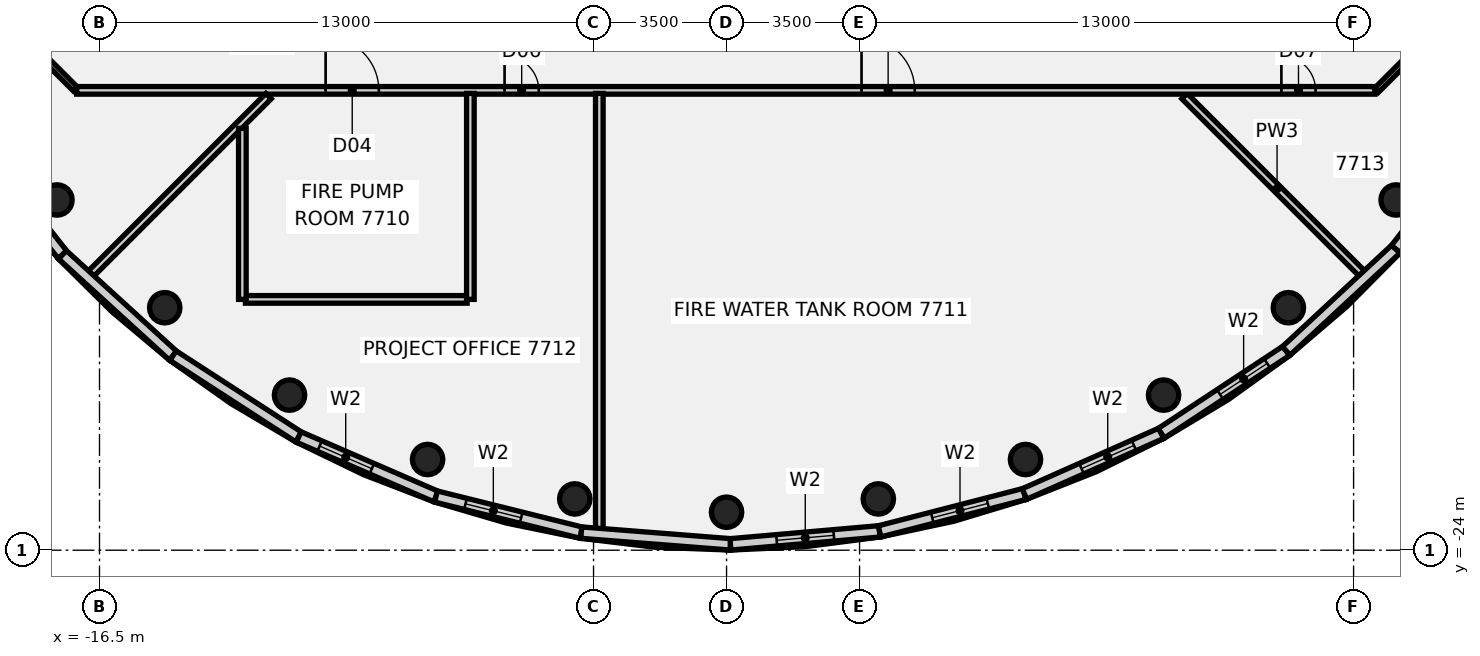
"""IFC4 building model, lengths in metres.
Left out: names, types, materials, properties, quantities, classifications, styles, units other than length and angle.
Written with IfcOpenShell. Run it as: python <this file> out.ifc"""

import sys

from ifc_helpers import new_model, si_unit, direction, frame, frame_2d, origin, origin_2d, place, context, subcontext, project, spatial, rectangle, circle, extrude, element, fill, save


model = new_model("IFC4")
c1 = context("Model", 3, precision=1e-05, world=origin(), true_north=direction((0.0, 1.0)))
c2 = subcontext(c1, "Body", "Model", "MODEL_VIEW")
j1 = project(units=[si_unit("LENGTHUNIT", "METRE"), si_unit("PLANEANGLEUNIT", "RADIAN")], contexts=[c1])
p1 = place(None, origin())
s1 = spatial("IfcSite", under=j1, at=p1, CompositionType="ELEMENT")
p2 = place(p1, origin())
s2 = spatial("IfcBuilding", under=s1, at=p2, CompositionType="ELEMENT")
p3 = place(p2, frame((0.0, 0.0, 313.4)))
s3 = spatial("IfcBuildingStorey", under=s2, at=p3, CompositionType="ELEMENT", Elevation=313.4)
for number, where, z_axis, x_axis in (
    (1, (-17.619, -14.784, -0.18), (0.0, 0.0, 1.0), (1.0, 0.0, 0.0)),
    (2, (-14.784, -17.619, -0.18), (0.0, 0.0, 1.0), (1.0, 0.0, 0.0)),
    (3, (-11.5, -19.919, -0.18), (0.0, 0.0, 1.0), (1.0, 0.0, 0.0)),
    (4, (-7.866, -21.613, -0.18), (0.0, 0.0, 1.0), (1.0, 0.0, 0.0)),
    (5, (-3.994, -22.651, -0.18), (0.0, 0.0, 1.0), (1.0, 0.0, 0.0)),
    (6, (0.0, -23.0, -0.18), (0.0, 0.0, 1.0), (1.0, 0.0, 0.0)),
    (7, (3.994, -22.651, -0.18), (0.0, 0.0, 1.0), (1.0, 0.0, 0.0)),
    (8, (7.866, -21.613, -0.18), (0.0, 0.0, 1.0), (1.0, 0.0, 0.0)),
    (9, (11.5, -19.919, -0.18), (0.0, 0.0, 1.0), (1.0, 0.0, 0.0)),
    (10, (14.784, -17.619, -0.18), (0.0, 0.0, 1.0), (1.0, 0.0, 0.0)),
    (11, (17.619, -14.784, -0.18), (0.0, 0.0, 1.0), (1.0, 0.0, 0.0)),
):
    element("IfcColumn", number, at=place(p3, frame(where, z_axis=z_axis, x_axis=x_axis)), inside=s3, PredefinedType="COLUMN", context=c2, shape_type="SweptSolid", body=[
        extrude(circle(Radius=0.4, at=origin_2d()), origin(), (0.0, 0.0, 1.0), 4.0),
    ])
p4 = place(p3, frame((-18.872, -10.128, 0.0), z_axis=(0.0, 0.0, 1.0), x_axis=(0.707106781187, -0.707106781187, 0.0)))
e12 = element("IfcWall", 12, at=p4, inside=s3, PredefinedType="PARTITIONING", context=c2, shape_type="SweptSolid", body=[
    extrude(rectangle(XDim=2.455, YDim=0.15, at=frame_2d((1.228, 0.0))), origin(), (0.0, 0.0, 1.0), 3.22),
])
p5 = place(p3, frame((12.052, -12.052, 0.0), z_axis=(0.0, 0.0, 1.0), x_axis=(0.707106781187, -0.707106781187, 0.0)))
e13 = element("IfcWall", 13, at=p5, inside=s3, PredefinedType="PARTITIONING", context=c2, shape_type="SweptSolid", body=[
    extrude(rectangle(XDim=6.886, YDim=0.2, at=frame_2d((3.443, 0.0))), origin(), (0.0, 0.0, 1.0), 3.22),
])
p6 = place(p3, frame((-17.1, -11.9, 0.0), z_axis=(0.0, 0.0, 1.0), x_axis=(1.0, 0.0, 0.0)))
e14 = element("IfcWall", 14, at=p6, inside=s3, PredefinedType="PARTITIONING", context=c2, shape_type="SweptSolid", body=[
    extrude(rectangle(XDim=34.165, YDim=0.2, at=frame_2d((17.083, 0.0))), origin(), (0.0, 0.0, 1.0), 3.22),
])
p7 = place(p6, frame((6.55, 0.0, 0.0)))
e15 = element("IfcOpeningElement", 15, at=p7, cuts=e14, PredefinedType="OPENING", context=c2, shape_type="SweptSolid", body=[
    extrude(rectangle(XDim=1.4, YDim=2.1, at=frame_2d((0.7, 1.05))), frame((0.0, 0.11, 0.0), z_axis=(0.0, -1.0, 0.0), x_axis=(1.0, 0.0, 0.0)), (0.0, 0.0, 1.0), 0.22),
])
p8 = place(p6, frame((20.652, 0.0, 0.0)))
e16 = element("IfcOpeningElement", 16, at=p8, cuts=e14, PredefinedType="OPENING", context=c2, shape_type="SweptSolid", body=[
    extrude(rectangle(XDim=1.4, YDim=2.1, at=frame_2d((0.7, 1.05))), frame((0.0, 0.11, 0.0), z_axis=(0.0, -1.0, 0.0), x_axis=(1.0, 0.0, 0.0)), (0.0, 0.0, 1.0), 0.22),
])
p9 = place(p6, frame((11.259, 0.0, 0.0)))
e17 = element("IfcOpeningElement", 17, at=p9, cuts=e14, PredefinedType="OPENING", context=c2, shape_type="SweptSolid", body=[
    extrude(rectangle(XDim=0.9, YDim=2.1, at=frame_2d((0.45, 1.05))), frame((0.0, 0.11, 0.0), z_axis=(0.0, -1.0, 0.0), x_axis=(1.0, 0.0, 0.0)), (0.0, 0.0, 1.0), 0.22),
])
p10 = place(p6, frame((31.7, 0.0, 0.0)))
e18 = element("IfcOpeningElement", 18, at=p10, cuts=e14, PredefinedType="OPENING", context=c2, shape_type="SweptSolid", body=[
    extrude(rectangle(XDim=0.9, YDim=2.1, at=frame_2d((0.45, 1.05))), frame((0.0, 0.11, 0.0), z_axis=(0.0, -1.0, 0.0), x_axis=(1.0, 0.0, 0.0)), (0.0, 0.0, 1.0), 0.22),
])
p11 = place(p3, frame((-12.661, -17.4, 0.0), z_axis=(0.0, 0.0, 1.0), x_axis=(1.0, 0.0, 0.0)))
e19 = element("IfcWall", 19, at=p11, inside=s3, PredefinedType="PARTITIONING", context=c2, shape_type="SweptSolid", body=[
    extrude(rectangle(XDim=5.835, YDim=0.2, at=frame_2d((2.917, 0.0))), origin(), (0.0, 0.0, 1.0), 3.22),
])
p12 = place(p3, frame((-16.927, -16.927, 0.0), z_axis=(0.0, 0.0, 1.0), x_axis=(0.707106781187, 0.707106781187, 0.0)))
e20 = element("IfcWall", 20, at=p12, inside=s3, PredefinedType="PARTITIONING", context=c2, shape_type="SweptSolid", body=[
    extrude(rectangle(XDim=6.894, YDim=0.2, at=frame_2d((3.447, 0.0))), origin(), (0.0, 0.0, 1.0), 3.22),
])
p13 = place(p3, frame((17.1, -11.9, 0.0), z_axis=(0.0, 0.0, 1.0), x_axis=(0.707106781187, 0.707106781187, 0.0)))
e21 = element("IfcWall", 21, at=p13, inside=s3, PredefinedType="PARTITIONING", context=c2, shape_type="SweptSolid", body=[
    extrude(rectangle(XDim=2.505, YDim=0.15, at=frame_2d((1.253, 0.0))), origin(), (0.0, 0.0, 1.0), 3.22),
])
p14 = place(p3, frame((-12.741, -17.4, 0.0), z_axis=(0.0, 0.0, 1.0), x_axis=(0.0, 1.0, 0.0)))
e22 = element("IfcWall", 22, at=p14, inside=s3, PredefinedType="PARTITIONING", context=c2, shape_type="SweptSolid", body=[
    extrude(rectangle(XDim=4.499, YDim=0.2, at=frame_2d((2.25, 0.0))), origin(), (0.0, 0.0, 1.0), 3.22),
])
p15 = place(p3, frame((-6.741, -17.4, 0.0), z_axis=(0.0, 0.0, 1.0), x_axis=(0.0, 1.0, 0.0)))
e23 = element("IfcWall", 23, at=p15, inside=s3, PredefinedType="PARTITIONING", context=c2, shape_type="SweptSolid", body=[
    extrude(rectangle(XDim=5.42, YDim=0.2, at=frame_2d((2.71, 0.0))), origin(), (0.0, 0.0, 1.0), 3.22),
])
p16 = place(p3, frame((-3.348, -23.724, 0.0), z_axis=(0.0, 0.0, 1.0), x_axis=(0.0, 1.0, 0.0)))
e24 = element("IfcWall", 24, at=p16, inside=s3, PredefinedType="PARTITIONING", context=c2, shape_type="SweptSolid", body=[
    extrude(rectangle(XDim=11.744, YDim=0.2, at=frame_2d((5.872, 0.0))), origin(), (0.0, 0.0, 1.0), 3.22),
])
p17 = place(p3, frame((-19.906, -13.128, 0.0), z_axis=(0.0, 0.0, 1.0), x_axis=(0.617577851206, -0.786509756901, 0.0)))
e25 = element("IfcWall", 25, at=p17, inside=s3, PredefinedType="SOLIDWALL", context=c2, shape_type="SweptSolid", body=[
    extrude(rectangle(XDim=3.938, YDim=0.3, at=frame_2d((1.969, 0.0))), origin(), (0.0, 0.0, 1.0), 3.82),
])
p18 = place(p3, frame((-17.474, -16.226, 0.0), z_axis=(0.0, 0.0, 1.0), x_axis=(0.738634435884, -0.674106200926, 0.0)))
e26 = element("IfcWall", 26, at=p18, inside=s3, PredefinedType="SOLIDWALL", context=c2, shape_type="SweptSolid", body=[
    extrude(rectangle(XDim=3.938, YDim=0.3, at=frame_2d((1.969, 0.0))), origin(), (0.0, 0.0, 1.0), 3.82),
])
p19 = place(p3, frame((-14.565, -18.881, 0.0), z_axis=(0.0, 0.0, 1.0), x_axis=(0.839498632024, -0.54336180104, 0.0)))
e27 = element("IfcWall", 27, at=p19, inside=s3, PredefinedType="SOLIDWALL", context=c2, shape_type="SweptSolid", body=[
    extrude(rectangle(XDim=3.938, YDim=0.3, at=frame_2d((1.969, 0.0))), origin(), (0.0, 0.0, 1.0), 3.82),
])
p20 = place(p3, frame((-11.259, -21.021, 0.0), z_axis=(0.0, 0.0, 1.0), x_axis=(0.917505110173, -0.397723990735, 0.0)))
e28 = element("IfcWall", 28, at=p20, inside=s3, PredefinedType="SOLIDWALL", context=c2, shape_type="SweptSolid", body=[
    extrude(rectangle(XDim=3.938, YDim=0.3, at=frame_2d((1.969, 0.0))), origin(), (0.0, 0.0, 1.0), 3.82),
])
p21 = place(p20, frame((0.6, 0.0, 1.4)))
e29 = element("IfcOpeningElement", 29, at=p21, cuts=e28, PredefinedType="OPENING", context=c2, shape_type="SweptSolid", body=[
    extrude(rectangle(XDim=1.498, YDim=2.12, at=frame_2d((0.749, 1.06))), frame((0.0, 0.16, 0.0), z_axis=(0.0, -1.0, 0.0), x_axis=(1.0, 0.0, 0.0)), (0.0, 0.0, 1.0), 0.32),
])
p22 = place(p3, frame((-7.646, -22.587, 0.0), z_axis=(0.0, 0.0, 1.0), x_axis=(0.970440788586, -0.241339337547, 0.0)))
e30 = element("IfcWall", 30, at=p22, inside=s3, PredefinedType="SOLIDWALL", context=c2, shape_type="SweptSolid", body=[
    extrude(rectangle(XDim=3.938, YDim=0.3, at=frame_2d((1.969, 0.0))), origin(), (0.0, 0.0, 1.0), 3.82),
])
p23 = place(p22, frame((0.801, 0.0, 1.4)))
e31 = element("IfcOpeningElement", 31, at=p23, cuts=e30, PredefinedType="OPENING", context=c2, shape_type="SweptSolid", body=[
    extrude(rectangle(XDim=1.509, YDim=2.12, at=frame_2d((0.754, 1.06))), frame((0.0, 0.16, 0.0), z_axis=(0.0, -1.0, 0.0), x_axis=(1.0, 0.0, 0.0)), (0.0, 0.0, 1.0), 0.32),
])
p24 = place(p3, frame((-3.824, -23.537, 0.0), z_axis=(0.0, 0.0, 1.0), x_axis=(0.996930318741, -0.078293930641, 0.0)))
e32 = element("IfcWall", 32, at=p24, inside=s3, PredefinedType="SOLIDWALL", context=c2, shape_type="SweptSolid", body=[
    extrude(rectangle(XDim=3.938, YDim=0.3, at=frame_2d((1.969, 0.0))), origin(), (0.0, 0.0, 1.0), 3.82),
])
p25 = place(p3, frame((0.103, -23.846, 0.0), z_axis=(0.0, 0.0, 1.0), x_axis=(0.99621635874, 0.08690780505, 0.0)))
e33 = element("IfcWall", 33, at=p25, inside=s3, PredefinedType="SOLIDWALL", context=c2, shape_type="SweptSolid", body=[
    extrude(rectangle(XDim=3.938, YDim=0.3, at=frame_2d((1.969, 0.0))), origin(), (0.0, 0.0, 1.0), 3.82),
])
p26 = place(p25, frame((1.221, 0.0, 1.4)))
e34 = element("IfcOpeningElement", 34, at=p26, cuts=e33, PredefinedType="OPENING", context=c2, shape_type="SweptSolid", body=[
    extrude(rectangle(XDim=1.509, YDim=2.12, at=frame_2d((0.755, 1.06))), frame((0.0, 0.16, 0.0), z_axis=(0.0, -1.0, 0.0), x_axis=(1.0, 0.0, 0.0)), (0.0, 0.0, 1.0), 0.32),
])
p27 = place(p3, frame((4.026, -23.503, 0.0), z_axis=(0.0, 0.0, 1.0), x_axis=(0.968336809904, 0.24964739651, 0.0)))
e35 = element("IfcWall", 35, at=p27, inside=s3, PredefinedType="SOLIDWALL", context=c2, shape_type="SweptSolid", body=[
    extrude(rectangle(XDim=3.938, YDim=0.3, at=frame_2d((1.969, 0.0))), origin(), (0.0, 0.0, 1.0), 3.82),
])
p28 = place(p27, frame((1.432, 0.0, 1.4)))
e36 = element("IfcOpeningElement", 36, at=p28, cuts=e35, PredefinedType="OPENING", context=c2, shape_type="SweptSolid", body=[
    extrude(rectangle(XDim=1.509, YDim=2.12, at=frame_2d((0.754, 1.06))), frame((0.0, 0.16, 0.0), z_axis=(0.0, -1.0, 0.0), x_axis=(1.0, 0.0, 0.0)), (0.0, 0.0, 1.0), 0.32),
])
p29 = place(p3, frame((7.84, -22.52, 0.0), z_axis=(0.0, 0.0, 1.0), x_axis=(0.91404912862, 0.405603489221, 0.0)))
e37 = element("IfcWall", 37, at=p29, inside=s3, PredefinedType="SOLIDWALL", context=c2, shape_type="SweptSolid", body=[
    extrude(rectangle(XDim=3.938, YDim=0.3, at=frame_2d((1.969, 0.0))), origin(), (0.0, 0.0, 1.0), 3.82),
])
p30 = place(p29, frame((1.643, 0.0, 1.4)))
e38 = element("IfcOpeningElement", 38, at=p30, cuts=e37, PredefinedType="OPENING", context=c2, shape_type="SweptSolid", body=[
    extrude(rectangle(XDim=1.509, YDim=2.12, at=frame_2d((0.754, 1.06))), frame((0.0, 0.16, 0.0), z_axis=(0.0, -1.0, 0.0), x_axis=(1.0, 0.0, 0.0)), (0.0, 0.0, 1.0), 0.32),
])
p31 = place(p3, frame((11.439, -20.923, 0.0), z_axis=(0.0, 0.0, 1.0), x_axis=(0.834786621205, 0.550573607302, 0.0)))
e39 = element("IfcWall", 39, at=p31, inside=s3, PredefinedType="SOLIDWALL", context=c2, shape_type="SweptSolid", body=[
    extrude(rectangle(XDim=3.938, YDim=0.3, at=frame_2d((1.969, 0.0))), origin(), (0.0, 0.0, 1.0), 3.82),
])
p32 = place(p31, frame((1.853, 0.0, 1.4)))
e40 = element("IfcOpeningElement", 40, at=p32, cuts=e39, PredefinedType="OPENING", context=c2, shape_type="SweptSolid", body=[
    extrude(rectangle(XDim=1.485, YDim=2.12, at=frame_2d((0.743, 1.06))), frame((0.0, 0.16, 0.0), z_axis=(0.0, -1.0, 0.0), x_axis=(1.0, 0.0, 0.0)), (0.0, 0.0, 1.0), 0.32),
])
p33 = place(p3, frame((14.727, -18.754, 0.0), z_axis=(0.0, 0.0, 1.0), x_axis=(0.732813362883, 0.680429698926, 0.0)))
e41 = element("IfcWall", 41, at=p33, inside=s3, PredefinedType="SOLIDWALL", context=c2, shape_type="SweptSolid", body=[
    extrude(rectangle(XDim=3.938, YDim=0.3, at=frame_2d((1.969, 0.0))), origin(), (0.0, 0.0, 1.0), 3.82),
])
p34 = place(p3, frame((17.613, -16.075, 0.0), z_axis=(0.0, 0.0, 1.0), x_axis=(0.610785688376, 0.79179596038, 0.0)))
e42 = element("IfcWall", 42, at=p34, inside=s3, PredefinedType="SOLIDWALL", context=c2, shape_type="SweptSolid", body=[
    extrude(rectangle(XDim=3.938, YDim=0.3, at=frame_2d((1.969, 0.0))), origin(), (0.0, 0.0, 1.0), 3.82),
])
p35 = place(p7, frame((1.4, 0.0, 0.0), z_axis=(0.0, 0.0, 1.0), x_axis=(-1.0, 0.0, 0.0)))
e43 = element("IfcDoor", 43, at=p35, inside=s3, OperationType="DOUBLE_DOOR_SINGLE_SWING", PredefinedType="DOOR", context=c2, shape_type="SweptSolid", body=[
    extrude(rectangle(XDim=1.4, YDim=2.1, at=frame_2d((0.7, 1.05))), frame((0.0, 0.025, 0.0), z_axis=(0.0, -1.0, 0.0), x_axis=(1.0, 0.0, 0.0)), (0.0, 0.0, 1.0), 0.05),
])
fill(e15, e43)
p36 = place(p8, frame((1.4, 0.0, 0.0), z_axis=(0.0, 0.0, 1.0), x_axis=(-1.0, 0.0, 0.0)))
e44 = element("IfcDoor", 44, at=p36, inside=s3, OperationType="DOUBLE_DOOR_SINGLE_SWING", PredefinedType="DOOR", context=c2, shape_type="SweptSolid", body=[
    extrude(rectangle(XDim=1.4, YDim=2.1, at=frame_2d((0.7, 1.05))), frame((0.0, 0.025, 0.0), z_axis=(0.0, -1.0, 0.0), x_axis=(1.0, 0.0, 0.0)), (0.0, 0.0, 1.0), 0.05),
])
fill(e16, e44)
p37 = place(p9, frame((0.9, 0.0, 0.0), z_axis=(0.0, 0.0, 1.0), x_axis=(-1.0, 0.0, 0.0)))
e45 = element("IfcDoor", 45, at=p37, inside=s3, OperationType="SINGLE_SWING_LEFT", PredefinedType="DOOR", context=c2, shape_type="SweptSolid", body=[
    extrude(rectangle(XDim=0.9, YDim=2.1, at=frame_2d((0.45, 1.05))), frame((0.0, 0.025, 0.0), z_axis=(0.0, -1.0, 0.0), x_axis=(1.0, 0.0, 0.0)), (0.0, 0.0, 1.0), 0.05),
])
fill(e17, e45)
p38 = place(p10, frame((0.9, 0.0, 0.0), z_axis=(0.0, 0.0, 1.0), x_axis=(-1.0, 0.0, 0.0)))
e46 = element("IfcDoor", 46, at=p38, inside=s3, OperationType="SINGLE_SWING_RIGHT", PredefinedType="DOOR", context=c2, shape_type="SweptSolid", body=[
    extrude(rectangle(XDim=0.9, YDim=2.1, at=frame_2d((0.45, 1.05))), frame((0.0, 0.025, 0.0), z_axis=(0.0, -1.0, 0.0), x_axis=(1.0, 0.0, 0.0)), (0.0, 0.0, 1.0), 0.05),
])
fill(e18, e46)
p39 = place(p21, origin())
e47 = element("IfcWindow", 47, at=p39, inside=s3, PartitioningType="SINGLE_PANEL", PredefinedType="WINDOW", context=c2, shape_type="SweptSolid", body=[
    extrude(rectangle(XDim=1.498, YDim=2.12, at=frame_2d((0.749, 1.06))), frame((0.0, 0.03, 0.0), z_axis=(0.0, -1.0, 0.0), x_axis=(1.0, 0.0, 0.0)), (0.0, 0.0, 1.0), 0.06),
])
fill(e29, e47)
p40 = place(p23, origin())
e48 = element("IfcWindow", 48, at=p40, inside=s3, PartitioningType="SINGLE_PANEL", PredefinedType="WINDOW", context=c2, shape_type="SweptSolid", body=[
    extrude(rectangle(XDim=1.509, YDim=2.12, at=frame_2d((0.754, 1.06))), frame((0.0, 0.03, 0.0), z_axis=(0.0, -1.0, 0.0), x_axis=(1.0, 0.0, 0.0)), (0.0, 0.0, 1.0), 0.06),
])
fill(e31, e48)
p41 = place(p26, origin())
e49 = element("IfcWindow", 49, at=p41, inside=s3, PartitioningType="SINGLE_PANEL", PredefinedType="WINDOW", context=c2, shape_type="SweptSolid", body=[
    extrude(rectangle(XDim=1.509, YDim=2.12, at=frame_2d((0.755, 1.06))), frame((0.0, 0.03, 0.0), z_axis=(0.0, -1.0, 0.0), x_axis=(1.0, 0.0, 0.0)), (0.0, 0.0, 1.0), 0.06),
])
fill(e34, e49)
p42 = place(p28, origin())
e50 = element("IfcWindow", 50, at=p42, inside=s3, PartitioningType="SINGLE_PANEL", PredefinedType="WINDOW", context=c2, shape_type="SweptSolid", body=[
    extrude(rectangle(XDim=1.509, YDim=2.12, at=frame_2d((0.754, 1.06))), frame((0.0, 0.03, 0.0), z_axis=(0.0, -1.0, 0.0), x_axis=(1.0, 0.0, 0.0)), (0.0, 0.0, 1.0), 0.06),
])
fill(e36, e50)
p43 = place(p30, origin())
e51 = element("IfcWindow", 51, at=p43, inside=s3, PartitioningType="SINGLE_PANEL", PredefinedType="WINDOW", context=c2, shape_type="SweptSolid", body=[
    extrude(rectangle(XDim=1.509, YDim=2.12, at=frame_2d((0.754, 1.06))), frame((0.0, 0.03, 0.0), z_axis=(0.0, -1.0, 0.0), x_axis=(1.0, 0.0, 0.0)), (0.0, 0.0, 1.0), 0.06),
])
fill(e38, e51)
p44 = place(p32, origin())
e52 = element("IfcWindow", 52, at=p44, inside=s3, PartitioningType="SINGLE_PANEL", PredefinedType="WINDOW", context=c2, shape_type="SweptSolid", body=[
    extrude(rectangle(XDim=1.485, YDim=2.12, at=frame_2d((0.743, 1.06))), frame((0.0, 0.03, 0.0), z_axis=(0.0, -1.0, 0.0), x_axis=(1.0, 0.0, 0.0)), (0.0, 0.0, 1.0), 0.06),
])
fill(e40, e52)
save(model, sys.argv[1])
